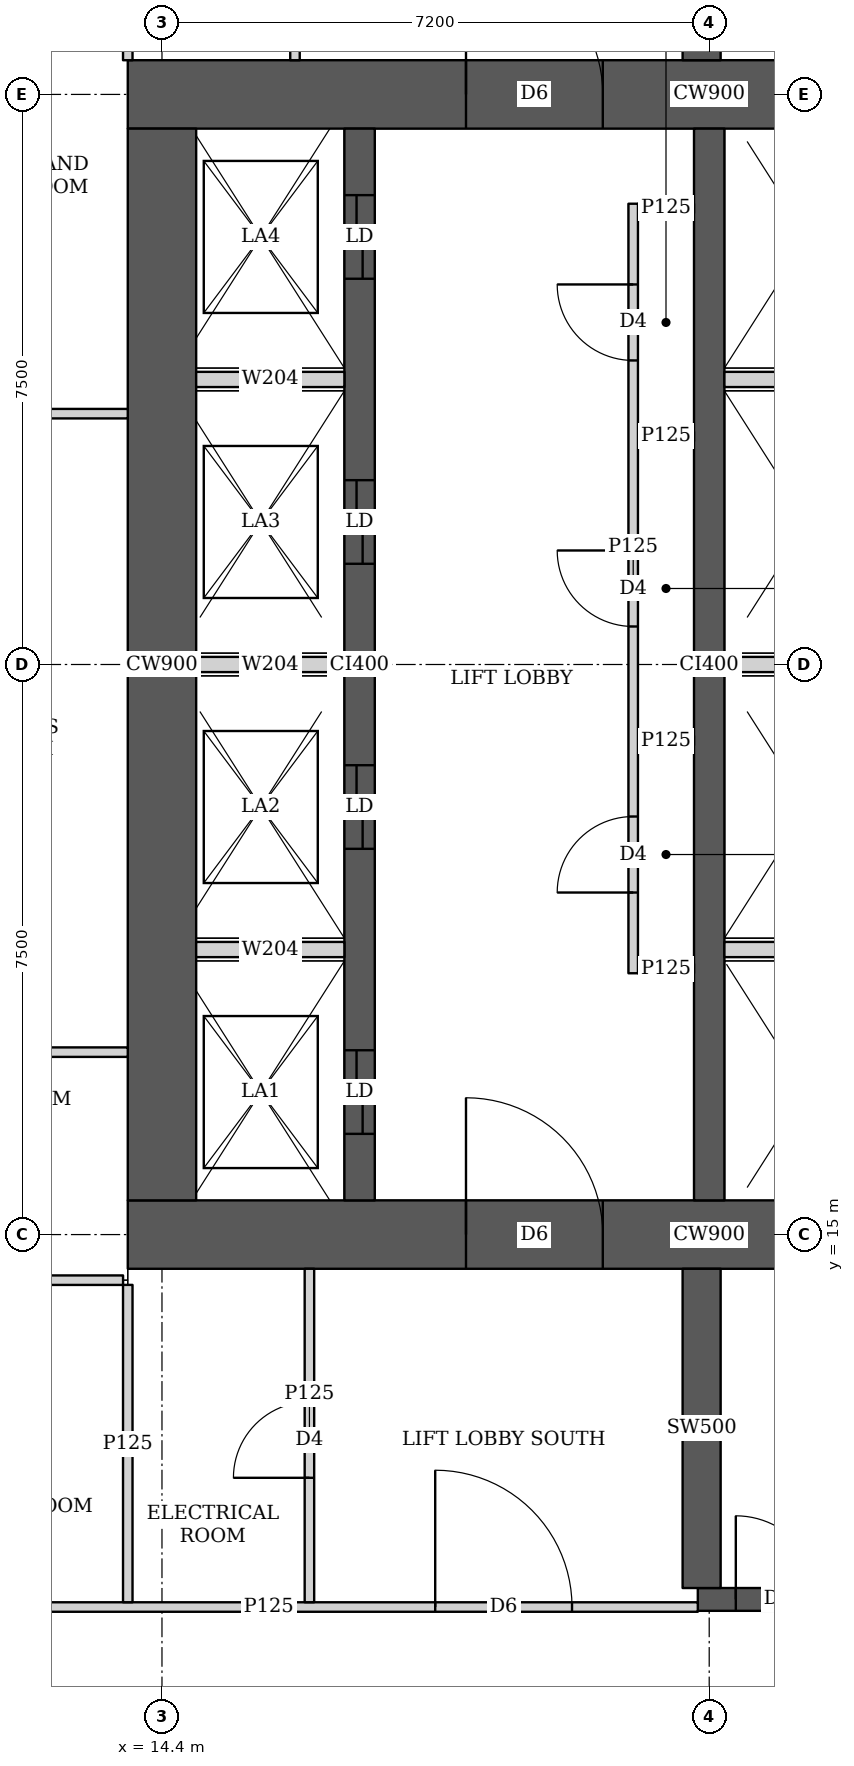
"""IFC4 building model, lengths in metres.
Left out: names, types, materials, properties, quantities, classifications, styles, units other than length and angle.
Written with IfcOpenShell. Run it as: python <this file> out.ifc"""

import sys

from ifc_helpers import new_model, si_unit, direction, frame, frame_2d, origin, place, context, subcontext, project, spatial, rectangle, extrude, element, fill, save


model = new_model("IFC4")
c1 = context("Model", 3, precision=1e-05, world=origin(), true_north=direction((0.0, 1.0)))
c2 = subcontext(c1, "Body", "Model", "MODEL_VIEW")
j1 = project(units=[si_unit("LENGTHUNIT", "METRE"), si_unit("PLANEANGLEUNIT", "RADIAN")], contexts=[c1])
p1 = place(None, origin())
s1 = spatial("IfcSite", under=j1, at=p1, CompositionType="ELEMENT")
p2 = place(p1, origin())
s2 = spatial("IfcBuilding", under=s1, at=p2, CompositionType="ELEMENT")
p3 = place(p2, frame((0.0, 0.0, 53.75)))
s3 = spatial("IfcBuildingStorey", under=s2, at=p3, CompositionType="ELEMENT", Elevation=53.75)
p4 = place(p3, frame((13.95, 15.0, 0.0), z_axis=(0.0, 0.0, 1.0), x_axis=(1.0, 0.0, 0.0)))
e1 = element("IfcWall", 1, at=p4, inside=s3, PredefinedType="SHEAR", context=c2, shape_type="SweptSolid", body=[
    extrude(rectangle(XDim=15.3, YDim=0.9, at=frame_2d((7.65, 0.0))), origin(), (0.0, 0.0, 1.0), 3.75),
])
p5 = place(p4, frame((4.45, 0.0, 0.0)))
e2 = element("IfcOpeningElement", 2, at=p5, cuts=e1, PredefinedType="OPENING", context=c2, shape_type="SweptSolid", body=[
    extrude(rectangle(XDim=1.8, YDim=2.1, at=frame_2d((0.9, 1.05))), frame((0.0, 0.46, 0.0), z_axis=(0.0, -1.0, 0.0), x_axis=(1.0, 0.0, 0.0)), (0.0, 0.0, 1.0), 0.92),
])
p6 = place(p4, frame((10.7, 0.0, 0.0)))
e3 = element("IfcOpeningElement", 3, at=p6, cuts=e1, PredefinedType="OPENING", context=c2, shape_type="SweptSolid", body=[
    extrude(rectangle(XDim=1.1, YDim=2.1, at=frame_2d((0.55, 1.05))), frame((0.0, 0.46, 0.0), z_axis=(0.0, -1.0, 0.0), x_axis=(1.0, 0.0, 0.0)), (0.0, 0.0, 1.0), 0.92),
])
p7 = place(p3, frame((13.95, 30.0, 0.0), z_axis=(0.0, 0.0, 1.0), x_axis=(1.0, 0.0, 0.0)))
e4 = element("IfcWall", 4, at=p7, inside=s3, PredefinedType="SHEAR", context=c2, shape_type="SweptSolid", body=[
    extrude(rectangle(XDim=15.3, YDim=0.9, at=frame_2d((7.65, 0.0))), origin(), (0.0, 0.0, 1.0), 3.75),
])
p8 = place(p7, frame((4.45, 0.0, 0.0)))
e5 = element("IfcOpeningElement", 5, at=p8, cuts=e4, PredefinedType="OPENING", context=c2, shape_type="SweptSolid", body=[
    extrude(rectangle(XDim=1.8, YDim=2.1, at=frame_2d((0.9, 1.05))), frame((0.0, 0.46, 0.0), z_axis=(0.0, -1.0, 0.0), x_axis=(1.0, 0.0, 0.0)), (0.0, 0.0, 1.0), 0.92),
])
p9 = place(p7, frame((10.7, 0.0, 0.0)))
e6 = element("IfcOpeningElement", 6, at=p9, cuts=e4, PredefinedType="OPENING", context=c2, shape_type="SweptSolid", body=[
    extrude(rectangle(XDim=1.1, YDim=2.1, at=frame_2d((0.55, 1.05))), frame((0.0, 0.46, 0.0), z_axis=(0.0, -1.0, 0.0), x_axis=(1.0, 0.0, 0.0)), (0.0, 0.0, 1.0), 0.92),
])
p10 = place(p3, frame((14.4, 15.45, 0.0), z_axis=(0.0, 0.0, 1.0), x_axis=(0.0, 1.0, 0.0)))
e7 = element("IfcWall", 7, at=p10, inside=s3, PredefinedType="SHEAR", context=c2, shape_type="SweptSolid", body=[
    extrude(rectangle(XDim=14.1, YDim=0.9, at=frame_2d((7.05, 0.0))), origin(), (0.0, 0.0, 1.0), 3.75),
])
p11 = place(p3, frame((17.0, 15.45, 0.0), z_axis=(0.0, 0.0, 1.0), x_axis=(0.0, 1.0, 0.0)))
e8 = element("IfcWall", 8, at=p11, inside=s3, PredefinedType="SHEAR", context=c2, shape_type="SweptSolid", body=[
    extrude(rectangle(XDim=14.1, YDim=0.4, at=frame_2d((7.05, 0.0))), origin(), (0.0, 0.0, 1.0), 3.75),
])
p12 = place(p11, frame((0.875, 0.0, 0.0)))
e9 = element("IfcOpeningElement", 9, at=p12, cuts=e8, PredefinedType="OPENING", context=c2, shape_type="SweptSolid", body=[
    extrude(rectangle(XDim=1.1, YDim=2.1, at=frame_2d((0.55, 1.05))), frame((0.0, 0.21, 0.0), z_axis=(0.0, -1.0, 0.0), x_axis=(1.0, 0.0, 0.0)), (0.0, 0.0, 1.0), 0.42),
])
p13 = place(p11, frame((4.625, 0.0, 0.0)))
e10 = element("IfcOpeningElement", 10, at=p13, cuts=e8, PredefinedType="OPENING", context=c2, shape_type="SweptSolid", body=[
    extrude(rectangle(XDim=1.1, YDim=2.1, at=frame_2d((0.55, 1.05))), frame((0.0, 0.21, 0.0), z_axis=(0.0, -1.0, 0.0), x_axis=(1.0, 0.0, 0.0)), (0.0, 0.0, 1.0), 0.42),
])
p14 = place(p11, frame((8.375, 0.0, 0.0)))
e11 = element("IfcOpeningElement", 11, at=p14, cuts=e8, PredefinedType="OPENING", context=c2, shape_type="SweptSolid", body=[
    extrude(rectangle(XDim=1.1, YDim=2.1, at=frame_2d((0.55, 1.05))), frame((0.0, 0.21, 0.0), z_axis=(0.0, -1.0, 0.0), x_axis=(1.0, 0.0, 0.0)), (0.0, 0.0, 1.0), 0.42),
])
p15 = place(p11, frame((12.125, 0.0, 0.0)))
e12 = element("IfcOpeningElement", 12, at=p15, cuts=e8, PredefinedType="OPENING", context=c2, shape_type="SweptSolid", body=[
    extrude(rectangle(XDim=1.1, YDim=2.1, at=frame_2d((0.55, 1.05))), frame((0.0, 0.21, 0.0), z_axis=(0.0, -1.0, 0.0), x_axis=(1.0, 0.0, 0.0)), (0.0, 0.0, 1.0), 0.42),
])
p16 = place(p3, frame((21.6, 15.45, 0.0), z_axis=(0.0, 0.0, 1.0), x_axis=(0.0, 1.0, 0.0)))
e13 = element("IfcWall", 13, at=p16, inside=s3, PredefinedType="SHEAR", context=c2, shape_type="SweptSolid", body=[
    extrude(rectangle(XDim=14.1, YDim=0.4, at=frame_2d((7.05, 0.0))), origin(), (0.0, 0.0, 1.0), 3.75),
])
p17 = place(p3, frame((21.45, 10.2, 0.0), z_axis=(0.0, 0.0, 1.0), x_axis=(1.0, 0.0, 0.0)))
e14 = element("IfcWall", 14, at=p17, inside=s3, PredefinedType="SHEAR", context=c2, shape_type="SweptSolid", body=[
    extrude(rectangle(XDim=7.5, YDim=0.3, at=frame_2d((3.75, 0.0))), origin(), (0.0, 0.0, 1.0), 3.75),
])
p18 = place(p17, frame((0.5, 0.0, 0.0)))
e15 = element("IfcOpeningElement", 15, at=p18, cuts=e14, PredefinedType="OPENING", context=c2, shape_type="SweptSolid", body=[
    extrude(rectangle(XDim=1.1, YDim=2.1, at=frame_2d((0.55, 1.05))), frame((0.0, 0.16, 0.0), z_axis=(0.0, -1.0, 0.0), x_axis=(1.0, 0.0, 0.0)), (0.0, 0.0, 1.0), 0.32),
])
for number, where, z_axis, x_axis in (
    (16, (21.5, 10.35, 0.0), (0.0, 0.0, 1.0), (0.0, 1.0, 0.0)),
    (17, (21.5, 30.45, 0.0), (0.0, 0.0, 1.0), (0.0, 1.0, 0.0)),
):
    element("IfcWall", number, at=place(p3, frame(where, z_axis=z_axis, x_axis=x_axis)), inside=s3, PredefinedType="SHEAR", context=c2, shape_type="SweptSolid", body=[
        extrude(rectangle(XDim=4.2, YDim=0.5, at=frame_2d((2.1, 0.0))), origin(), (0.0, 0.0, 1.0), 3.75),
    ])
p19 = place(p3, frame((10.163, 14.4, 0.0), z_axis=(0.0, 0.0, 1.0), x_axis=(1.0, 0.0, 0.0)))
e18 = element("IfcWall", 18, at=p19, inside=s3, PredefinedType="PARTITIONING", context=c2, shape_type="SweptSolid", body=[
    extrude(rectangle(XDim=3.725, YDim=0.125, at=frame_2d((1.862, 0.0))), origin(), (0.0, 0.0, 1.0), 3.5),
])
for number, where, z_axis, x_axis in (
    (19, (10.163, 17.4, 0.0), (0.0, 0.0, 1.0), (1.0, 0.0, 0.0)),
    (20, (10.163, 25.8, 0.0), (0.0, 0.0, 1.0), (1.0, 0.0, 0.0)),
):
    element("IfcWall", number, at=place(p3, frame(where, z_axis=z_axis, x_axis=x_axis)), inside=s3, PredefinedType="PARTITIONING", context=c2, shape_type="SweptSolid", body=[
        extrude(rectangle(XDim=3.787, YDim=0.125, at=frame_2d((1.894, 0.0))), origin(), (0.0, 0.0, 1.0), 3.5),
    ])
p20 = place(p3, frame((13.95, 10.163, 0.0), z_axis=(0.0, 0.0, 1.0), x_axis=(0.0, 1.0, 0.0)))
e21 = element("IfcWall", 21, at=p20, inside=s3, PredefinedType="PARTITIONING", context=c2, shape_type="SweptSolid", body=[
    extrude(rectangle(XDim=4.175, YDim=0.125, at=frame_2d((2.087, 0.0))), origin(), (0.0, 0.0, 1.0), 3.5),
])
p21 = place(p3, frame((13.95, 30.45, 0.0), z_axis=(0.0, 0.0, 1.0), x_axis=(0.0, 1.0, 0.0)))
e22 = element("IfcWall", 22, at=p21, inside=s3, PredefinedType="PARTITIONING", context=c2, shape_type="SweptSolid", body=[
    extrude(rectangle(XDim=4.387, YDim=0.125, at=frame_2d((2.193, 0.0))), origin(), (0.0, 0.0, 1.0), 3.5),
])
p22 = place(p3, frame((10.163, 10.1, 0.0), z_axis=(0.0, 0.0, 1.0), x_axis=(1.0, 0.0, 0.0)))
e23 = element("IfcWall", 23, at=p22, inside=s3, PredefinedType="PARTITIONING", context=c2, shape_type="SweptSolid", body=[
    extrude(rectangle(XDim=11.287, YDim=0.125, at=frame_2d((5.644, 0.0))), origin(), (0.0, 0.0, 1.0), 3.5),
])
p23 = place(p22, frame((7.832, 0.0, 0.0)))
e24 = element("IfcOpeningElement", 24, at=p23, cuts=e23, PredefinedType="OPENING", context=c2, shape_type="SweptSolid", body=[
    extrude(rectangle(XDim=1.8, YDim=2.1, at=frame_2d((0.9, 1.05))), frame((0.0, 0.073, 0.0), z_axis=(0.0, -1.0, 0.0), x_axis=(1.0, 0.0, 0.0)), (0.0, 0.0, 1.0), 0.145),
])
p24 = place(p3, frame((16.34, 10.163, 0.0), z_axis=(0.0, 0.0, 1.0), x_axis=(0.0, 1.0, 0.0)))
e25 = element("IfcWall", 25, at=p24, inside=s3, PredefinedType="PARTITIONING", context=c2, shape_type="SweptSolid", body=[
    extrude(rectangle(XDim=4.387, YDim=0.125, at=frame_2d((2.193, 0.0))), origin(), (0.0, 0.0, 1.0), 3.5),
])
p25 = place(p24, frame((1.637, 0.0, 0.0)))
e26 = element("IfcOpeningElement", 26, at=p25, cuts=e25, PredefinedType="OPENING", context=c2, shape_type="SweptSolid", body=[
    extrude(rectangle(XDim=1.0, YDim=2.1, at=frame_2d((0.5, 1.05))), frame((0.0, 0.073, 0.0), z_axis=(0.0, -1.0, 0.0), x_axis=(1.0, 0.0, 0.0)), (0.0, 0.0, 1.0), 0.145),
])
p26 = place(p3, frame((16.15, 30.45, 0.0), z_axis=(0.0, 0.0, 1.0), x_axis=(0.0, 1.0, 0.0)))
e27 = element("IfcWall", 27, at=p26, inside=s3, PredefinedType="PARTITIONING", context=c2, shape_type="SweptSolid", body=[
    extrude(rectangle(XDim=4.387, YDim=0.125, at=frame_2d((2.193, 0.0))), origin(), (0.0, 0.0, 1.0), 3.5),
])
p27 = place(p26, frame((1.75, 0.0, 0.0)))
e28 = element("IfcOpeningElement", 28, at=p27, cuts=e27, PredefinedType="OPENING", context=c2, shape_type="SweptSolid", body=[
    extrude(rectangle(XDim=1.0, YDim=2.1, at=frame_2d((0.5, 1.05))), frame((0.0, 0.073, 0.0), z_axis=(0.0, -1.0, 0.0), x_axis=(1.0, 0.0, 0.0)), (0.0, 0.0, 1.0), 0.145),
])
p28 = place(p3, frame((20.6, 18.438, 0.0), z_axis=(0.0, 0.0, 1.0), x_axis=(0.0, 1.0, 0.0)))
e29 = element("IfcWall", 29, at=p28, inside=s3, PredefinedType="PARTITIONING", context=c2, shape_type="SweptSolid", body=[
    extrude(rectangle(XDim=10.124, YDim=0.125, at=frame_2d((5.062, 0.0))), origin(), (0.0, 0.0, 1.0), 3.5),
])
p29 = place(p28, frame((1.062, 0.0, 0.0)))
e30 = element("IfcOpeningElement", 30, at=p29, cuts=e29, PredefinedType="OPENING", context=c2, shape_type="SweptSolid", body=[
    extrude(rectangle(XDim=1.0, YDim=2.1, at=frame_2d((0.5, 1.05))), frame((0.0, 0.073, 0.0), z_axis=(0.0, -1.0, 0.0), x_axis=(1.0, 0.0, 0.0)), (0.0, 0.0, 1.0), 0.145),
])
p30 = place(p28, frame((4.562, 0.0, 0.0)))
e31 = element("IfcOpeningElement", 31, at=p30, cuts=e29, PredefinedType="OPENING", context=c2, shape_type="SweptSolid", body=[
    extrude(rectangle(XDim=1.0, YDim=2.1, at=frame_2d((0.5, 1.05))), frame((0.0, 0.073, 0.0), z_axis=(0.0, -1.0, 0.0), x_axis=(1.0, 0.0, 0.0)), (0.0, 0.0, 1.0), 0.145),
])
p31 = place(p28, frame((8.062, 0.0, 0.0)))
e32 = element("IfcOpeningElement", 32, at=p31, cuts=e29, PredefinedType="OPENING", context=c2, shape_type="SweptSolid", body=[
    extrude(rectangle(XDim=1.0, YDim=2.1, at=frame_2d((0.5, 1.05))), frame((0.0, 0.073, 0.0), z_axis=(0.0, -1.0, 0.0), x_axis=(1.0, 0.0, 0.0)), (0.0, 0.0, 1.0), 0.145),
])
for number, where, z_axis, x_axis in (
    (33, (20.663, 18.5, 0.0), (0.0, 0.0, 1.0), (1.0, 0.0, 0.0)),
    (34, (20.663, 28.5, 0.0), (0.0, 0.0, 1.0), (1.0, 0.0, 0.0)),
    (35, (20.663, 21.5, 0.0), (0.0, 0.0, 1.0), (1.0, 0.0, 0.0)),
    (36, (20.663, 25.5, 0.0), (0.0, 0.0, 1.0), (1.0, 0.0, 0.0)),
):
    element("IfcWall", number, at=place(p3, frame(where, z_axis=z_axis, x_axis=x_axis)), inside=s3, PredefinedType="PARTITIONING", context=c2, shape_type="SweptSolid", body=[
        extrude(rectangle(XDim=0.737, YDim=0.125, at=frame_2d((0.368, 0.0))), origin(), (0.0, 0.0, 1.0), 3.5),
    ])
p32 = place(p3, frame((14.85, 18.75, 0.0), z_axis=(0.0, 0.0, 1.0), x_axis=(1.0, 0.0, 0.0)))
e37 = element("IfcWall", 37, at=p32, inside=s3, PredefinedType="SOLIDWALL", context=c2, shape_type="SweptSolid", body=[
    extrude(rectangle(XDim=1.95, YDim=0.2, at=frame_2d((0.975, 0.0))), origin(), (0.0, 0.0, 1.0), 3.5),
])
p33 = place(p3, frame((21.8, 18.75, 0.0), z_axis=(0.0, 0.0, 1.0), x_axis=(1.0, 0.0, 0.0)))
e38 = element("IfcWall", 38, at=p33, inside=s3, PredefinedType="SOLIDWALL", context=c2, shape_type="SweptSolid", body=[
    extrude(rectangle(XDim=2.2, YDim=0.2, at=frame_2d((1.1, 0.0))), origin(), (0.0, 0.0, 1.0), 3.5),
])
p34 = place(p3, frame((14.85, 22.5, 0.0), z_axis=(0.0, 0.0, 1.0), x_axis=(1.0, 0.0, 0.0)))
e39 = element("IfcWall", 39, at=p34, inside=s3, PredefinedType="SOLIDWALL", context=c2, shape_type="SweptSolid", body=[
    extrude(rectangle(XDim=1.95, YDim=0.2, at=frame_2d((0.975, 0.0))), origin(), (0.0, 0.0, 1.0), 3.5),
])
p35 = place(p3, frame((21.8, 22.5, 0.0), z_axis=(0.0, 0.0, 1.0), x_axis=(1.0, 0.0, 0.0)))
e40 = element("IfcWall", 40, at=p35, inside=s3, PredefinedType="SOLIDWALL", context=c2, shape_type="SweptSolid", body=[
    extrude(rectangle(XDim=2.2, YDim=0.2, at=frame_2d((1.1, 0.0))), origin(), (0.0, 0.0, 1.0), 3.5),
])
p36 = place(p3, frame((14.85, 26.25, 0.0), z_axis=(0.0, 0.0, 1.0), x_axis=(1.0, 0.0, 0.0)))
e41 = element("IfcWall", 41, at=p36, inside=s3, PredefinedType="SOLIDWALL", context=c2, shape_type="SweptSolid", body=[
    extrude(rectangle(XDim=1.95, YDim=0.2, at=frame_2d((0.975, 0.0))), origin(), (0.0, 0.0, 1.0), 3.5),
])
p37 = place(p3, frame((21.8, 26.25, 0.0), z_axis=(0.0, 0.0, 1.0), x_axis=(1.0, 0.0, 0.0)))
e42 = element("IfcWall", 42, at=p37, inside=s3, PredefinedType="SOLIDWALL", context=c2, shape_type="SweptSolid", body=[
    extrude(rectangle(XDim=2.2, YDim=0.2, at=frame_2d((1.1, 0.0))), origin(), (0.0, 0.0, 1.0), 3.5),
])
p38 = place(p25, origin())
e43 = element("IfcDoor", 43, at=p38, inside=s3, OperationType="SINGLE_SWING_LEFT", PredefinedType="DOOR", context=c2, shape_type="SweptSolid", body=[
    extrude(rectangle(XDim=1.0, YDim=2.1, at=frame_2d((0.5, 1.05))), frame((0.0, 0.025, 0.0), z_axis=(0.0, -1.0, 0.0), x_axis=(1.0, 0.0, 0.0)), (0.0, 0.0, 1.0), 0.05),
])
fill(e26, e43)
p39 = place(p23, origin())
e44 = element("IfcDoor", 44, at=p39, inside=s3, OperationType="DOUBLE_DOOR_SINGLE_SWING", PredefinedType="DOOR", context=c2, shape_type="SweptSolid", body=[
    extrude(rectangle(XDim=1.8, YDim=2.1, at=frame_2d((0.9, 1.05))), frame((0.0, 0.025, 0.0), z_axis=(0.0, -1.0, 0.0), x_axis=(1.0, 0.0, 0.0)), (0.0, 0.0, 1.0), 0.05),
])
fill(e24, e44)
p40 = place(p29, origin())
e45 = element("IfcDoor", 45, at=p40, inside=s3, OperationType="SINGLE_SWING_LEFT", PredefinedType="DOOR", context=c2, shape_type="SweptSolid", body=[
    extrude(rectangle(XDim=1.0, YDim=2.1, at=frame_2d((0.5, 1.05))), frame((0.0, 0.025, 0.0), z_axis=(0.0, -1.0, 0.0), x_axis=(1.0, 0.0, 0.0)), (0.0, 0.0, 1.0), 0.05),
])
fill(e30, e45)
p41 = place(p30, origin())
e46 = element("IfcDoor", 46, at=p41, inside=s3, OperationType="SINGLE_SWING_RIGHT", PredefinedType="DOOR", context=c2, shape_type="SweptSolid", body=[
    extrude(rectangle(XDim=1.0, YDim=2.1, at=frame_2d((0.5, 1.05))), frame((0.0, 0.025, 0.0), z_axis=(0.0, -1.0, 0.0), x_axis=(1.0, 0.0, 0.0)), (0.0, 0.0, 1.0), 0.05),
])
fill(e31, e46)
p42 = place(p31, origin())
e47 = element("IfcDoor", 47, at=p42, inside=s3, OperationType="SINGLE_SWING_RIGHT", PredefinedType="DOOR", context=c2, shape_type="SweptSolid", body=[
    extrude(rectangle(XDim=1.0, YDim=2.1, at=frame_2d((0.5, 1.05))), frame((0.0, 0.025, 0.0), z_axis=(0.0, -1.0, 0.0), x_axis=(1.0, 0.0, 0.0)), (0.0, 0.0, 1.0), 0.05),
])
fill(e32, e47)
p43 = place(p5, origin())
e48 = element("IfcDoor", 48, at=p43, inside=s3, OperationType="DOUBLE_DOOR_SINGLE_SWING", PredefinedType="DOOR", context=c2, shape_type="SweptSolid", body=[
    extrude(rectangle(XDim=1.8, YDim=2.1, at=frame_2d((0.9, 1.05))), frame((0.0, 0.025, 0.0), z_axis=(0.0, -1.0, 0.0), x_axis=(1.0, 0.0, 0.0)), (0.0, 0.0, 1.0), 0.05),
])
fill(e2, e48)
p44 = place(p8, origin())
e49 = element("IfcDoor", 49, at=p44, inside=s3, OperationType="DOUBLE_DOOR_SINGLE_SWING", PredefinedType="DOOR", context=c2, shape_type="SweptSolid", body=[
    extrude(rectangle(XDim=1.8, YDim=2.1, at=frame_2d((0.9, 1.05))), frame((0.0, 0.025, 0.0), z_axis=(0.0, -1.0, 0.0), x_axis=(1.0, 0.0, 0.0)), (0.0, 0.0, 1.0), 0.05),
])
fill(e5, e49)
p45 = place(p12, origin())
e50 = element("IfcDoor", 50, at=p45, inside=s3, OperationType="DOUBLE_DOOR_SLIDING", PredefinedType="DOOR", context=c2, shape_type="SweptSolid", body=[
    extrude(rectangle(XDim=1.1, YDim=2.1, at=frame_2d((0.55, 1.05))), frame((0.0, 0.025, 0.0), z_axis=(0.0, -1.0, 0.0), x_axis=(1.0, 0.0, 0.0)), (0.0, 0.0, 1.0), 0.05),
])
fill(e9, e50)
p46 = place(p13, origin())
e51 = element("IfcDoor", 51, at=p46, inside=s3, OperationType="DOUBLE_DOOR_SLIDING", PredefinedType="DOOR", context=c2, shape_type="SweptSolid", body=[
    extrude(rectangle(XDim=1.1, YDim=2.1, at=frame_2d((0.55, 1.05))), frame((0.0, 0.025, 0.0), z_axis=(0.0, -1.0, 0.0), x_axis=(1.0, 0.0, 0.0)), (0.0, 0.0, 1.0), 0.05),
])
fill(e10, e51)
p47 = place(p14, origin())
e52 = element("IfcDoor", 52, at=p47, inside=s3, OperationType="DOUBLE_DOOR_SLIDING", PredefinedType="DOOR", context=c2, shape_type="SweptSolid", body=[
    extrude(rectangle(XDim=1.1, YDim=2.1, at=frame_2d((0.55, 1.05))), frame((0.0, 0.025, 0.0), z_axis=(0.0, -1.0, 0.0), x_axis=(1.0, 0.0, 0.0)), (0.0, 0.0, 1.0), 0.05),
])
fill(e11, e52)
p48 = place(p15, origin())
e53 = element("IfcDoor", 53, at=p48, inside=s3, OperationType="DOUBLE_DOOR_SLIDING", PredefinedType="DOOR", context=c2, shape_type="SweptSolid", body=[
    extrude(rectangle(XDim=1.1, YDim=2.1, at=frame_2d((0.55, 1.05))), frame((0.0, 0.025, 0.0), z_axis=(0.0, -1.0, 0.0), x_axis=(1.0, 0.0, 0.0)), (0.0, 0.0, 1.0), 0.05),
])
fill(e12, e53)
p49 = place(p18, origin())
e54 = element("IfcDoor", 54, at=p49, inside=s3, OperationType="SINGLE_SWING_LEFT", PredefinedType="DOOR", context=c2, shape_type="SweptSolid", body=[
    extrude(rectangle(XDim=1.1, YDim=2.1, at=frame_2d((0.55, 1.05))), frame((0.0, 0.025, 0.0), z_axis=(0.0, -1.0, 0.0), x_axis=(1.0, 0.0, 0.0)), (0.0, 0.0, 1.0), 0.05),
])
fill(e15, e54)
save(model, sys.argv[1])
